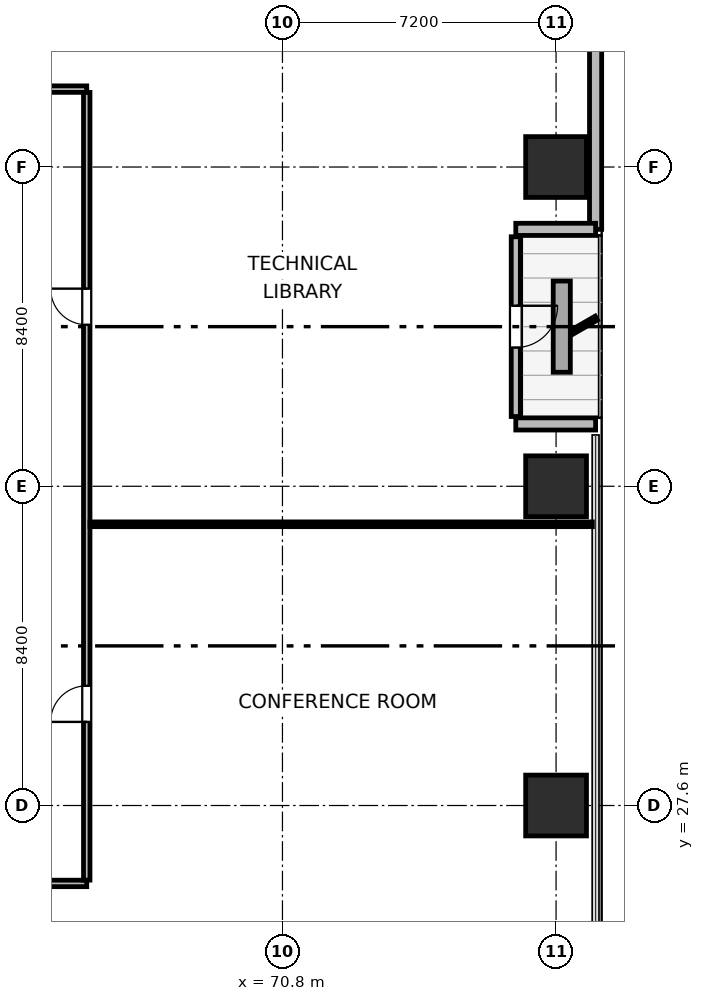
"""IFC4 building model, lengths in metres.
Left out: names, types, materials, properties, quantities, classifications, styles, units other than length and angle.
Written with IfcOpenShell. Run it as: python <this file> out.ifc"""

import sys

from ifc_helpers import new_model, si_unit, direction, frame, frame_2d, origin, origin_2d, place, context, subcontext, project, spatial, rectangle, extrude, element, fill, save


model = new_model("IFC4")
c1 = context("Model", 3, precision=1e-05, world=origin(), true_north=direction((0.0, 1.0)))
c2 = subcontext(c1, "Body", "Model", "MODEL_VIEW")
j1 = project(units=[si_unit("LENGTHUNIT", "METRE"), si_unit("PLANEANGLEUNIT", "RADIAN")], contexts=[c1])
p1 = place(None, origin())
s1 = spatial("IfcSite", under=j1, at=p1, CompositionType="ELEMENT")
p2 = place(p1, origin())
s2 = spatial("IfcBuilding", under=s1, at=p2, CompositionType="ELEMENT")
p3 = place(p2, frame((0.0, 0.0, 21.6)))
s3 = spatial("IfcBuildingStorey", under=s2, at=p3, CompositionType="ELEMENT", Elevation=21.6)
for number, where, z_axis, x_axis in (
    (1, (78.0, 27.6, 0.0), (0.0, 0.0, 1.0), (1.0, 0.0, 0.0)),
    (2, (78.0, 36.0, 0.0), (0.0, 0.0, 1.0), (1.0, 0.0, 0.0)),
    (3, (78.0, 44.4, 0.0), (0.0, 0.0, 1.0), (1.0, 0.0, 0.0)),
):
    element("IfcColumn", number, at=place(p3, frame(where, z_axis=z_axis, x_axis=x_axis)), inside=s3, PredefinedType="COLUMN", context=c2, shape_type="SweptSolid", body=[
        extrude(rectangle(XDim=1.6, YDim=1.6, at=origin_2d()), origin(), (0.0, 0.0, 1.0), 3.9),
    ])
p4 = place(p3, frame((79.04, 56.979, 0.0), z_axis=(0.0, 0.0, 1.0), x_axis=(0.0, -1.0, 0.0)))
e4 = element("IfcWall", 4, at=p4, inside=s3, PredefinedType="SOLIDWALL", context=c2, shape_type="SweptSolid", body=[
    extrude(rectangle(XDim=14.219, YDim=0.32, at=frame_2d((7.109, 0.0))), origin(), (0.0, 0.0, 1.0), 3.64),
])
p5 = place(p3, frame((79.04, 42.76, 0.0), z_axis=(0.0, 0.0, 1.0), x_axis=(-1.0, 0.0, 0.0)))
e5 = element("IfcWall", 5, at=p5, inside=s3, PredefinedType="SOLIDWALL", context=c2, shape_type="SweptSolid", body=[
    extrude(rectangle(XDim=2.1, YDim=0.32, at=frame_2d((1.05, 0.0))), origin(), (0.0, 0.0, 1.0), 2.875),
])
p6 = place(p3, frame((76.94, 42.565, 0.0), z_axis=(0.0, 0.0, 1.0), x_axis=(0.0, -1.0, 0.0)))
e6 = element("IfcWall", 6, at=p6, inside=s3, PredefinedType="SOLIDWALL", context=c2, shape_type="SweptSolid", body=[
    extrude(rectangle(XDim=4.73, YDim=0.24, at=frame_2d((2.365, 0.0))), origin(), (0.0, 0.0, 1.0), 3.162),
])
p7 = place(p6, frame((1.815, 0.0, 0.0)))
e7 = element("IfcOpeningElement", 7, at=p7, cuts=e6, PredefinedType="OPENING", context=c2, shape_type="SweptSolid", body=[
    extrude(rectangle(XDim=1.1, YDim=2.04, at=frame_2d((0.55, 1.02))), frame((0.0, 0.13, 0.0), z_axis=(0.0, -1.0, 0.0), x_axis=(1.0, 0.0, 0.0)), (0.0, 0.0, 1.0), 0.26),
])
p8 = place(p3, frame((76.94, 37.64, 0.0), z_axis=(0.0, 0.0, 1.0), x_axis=(1.0, 0.0, 0.0)))
e8 = element("IfcWall", 8, at=p8, inside=s3, PredefinedType="SOLIDWALL", context=c2, shape_type="SweptSolid", body=[
    extrude(rectangle(XDim=2.1, YDim=0.32, at=frame_2d((1.05, 0.0))), origin(), (0.0, 0.0, 1.0), 2.875),
])
p9 = place(p3, frame((30.35, 25.55, 0.0), z_axis=(0.0, 0.0, 1.0), x_axis=(1.0, 0.0, 0.0)))
e9 = element("IfcWall", 9, at=p9, inside=s3, PredefinedType="PARTITIONING", context=c2, shape_type="SweptSolid", body=[
    extrude(rectangle(XDim=35.3, YDim=0.17, at=frame_2d((17.65, 0.0))), origin(), (0.0, 0.0, 1.0), 3.64),
])
p10 = place(p9, frame((8.35, 0.0, 0.0)))
e10 = element("IfcOpeningElement", 10, at=p10, cuts=e9, PredefinedType="OPENING", context=c2, shape_type="SweptSolid", body=[
    extrude(rectangle(XDim=0.95, YDim=2.04, at=frame_2d((0.475, 1.02))), frame((0.0, 0.095, 0.0), z_axis=(0.0, -1.0, 0.0), x_axis=(1.0, 0.0, 0.0)), (0.0, 0.0, 1.0), 0.19),
])
p11 = place(p9, frame((26.0, 0.0, 0.0)))
e11 = element("IfcOpeningElement", 11, at=p11, cuts=e9, PredefinedType="OPENING", context=c2, shape_type="SweptSolid", body=[
    extrude(rectangle(XDim=0.95, YDim=2.04, at=frame_2d((0.475, 1.02))), frame((0.0, 0.095, 0.0), z_axis=(0.0, -1.0, 0.0), x_axis=(1.0, 0.0, 0.0)), (0.0, 0.0, 1.0), 0.19),
])
p12 = place(p3, frame((30.35, 46.45, 0.0), z_axis=(0.0, 0.0, 1.0), x_axis=(1.0, 0.0, 0.0)))
e12 = element("IfcWall", 12, at=p12, inside=s3, PredefinedType="PARTITIONING", context=c2, shape_type="SweptSolid", body=[
    extrude(rectangle(XDim=35.3, YDim=0.17, at=frame_2d((17.65, 0.0))), origin(), (0.0, 0.0, 1.0), 3.64),
])
p13 = place(p12, frame((6.21, 0.0, 0.0)))
e13 = element("IfcOpeningElement", 13, at=p13, cuts=e12, PredefinedType="OPENING", context=c2, shape_type="SweptSolid", body=[
    extrude(rectangle(XDim=0.95, YDim=2.04, at=frame_2d((0.475, 1.02))), frame((0.0, 0.095, 0.0), z_axis=(0.0, -1.0, 0.0), x_axis=(1.0, 0.0, 0.0)), (0.0, 0.0, 1.0), 0.19),
])
p14 = place(p12, frame((15.38, 0.0, 0.0)))
e14 = element("IfcOpeningElement", 14, at=p14, cuts=e12, PredefinedType="OPENING", context=c2, shape_type="SweptSolid", body=[
    extrude(rectangle(XDim=0.95, YDim=2.04, at=frame_2d((0.475, 1.02))), frame((0.0, 0.095, 0.0), z_axis=(0.0, -1.0, 0.0), x_axis=(1.0, 0.0, 0.0)), (0.0, 0.0, 1.0), 0.19),
])
p15 = place(p12, frame((26.345, 0.0, 0.0)))
e15 = element("IfcOpeningElement", 15, at=p15, cuts=e12, PredefinedType="OPENING", context=c2, shape_type="SweptSolid", body=[
    extrude(rectangle(XDim=0.95, YDim=2.04, at=frame_2d((0.475, 1.02))), frame((0.0, 0.095, 0.0), z_axis=(0.0, -1.0, 0.0), x_axis=(1.0, 0.0, 0.0)), (0.0, 0.0, 1.0), 0.19),
])
p16 = place(p3, frame((65.65, 25.637, 0.0), z_axis=(0.0, 0.0, 1.0), x_axis=(0.0, 1.0, 0.0)))
e16 = element("IfcWall", 16, at=p16, inside=s3, PredefinedType="PARTITIONING", context=c2, shape_type="SweptSolid", body=[
    extrude(rectangle(XDim=20.726, YDim=0.17, at=frame_2d((10.363, 0.0))), origin(), (0.0, 0.0, 1.0), 3.64),
])
p17 = place(p16, frame((4.163, 0.0, 0.0)))
e17 = element("IfcOpeningElement", 17, at=p17, cuts=e16, PredefinedType="OPENING", context=c2, shape_type="SweptSolid", body=[
    extrude(rectangle(XDim=0.95, YDim=2.04, at=frame_2d((0.475, 1.02))), frame((0.0, 0.095, 0.0), z_axis=(0.0, -1.0, 0.0), x_axis=(1.0, 0.0, 0.0)), (0.0, 0.0, 1.0), 0.19),
])
p18 = place(p16, frame((14.613, 0.0, 0.0)))
e18 = element("IfcOpeningElement", 18, at=p18, cuts=e16, PredefinedType="OPENING", context=c2, shape_type="SweptSolid", body=[
    extrude(rectangle(XDim=0.95, YDim=2.04, at=frame_2d((0.475, 1.02))), frame((0.0, 0.095, 0.0), z_axis=(0.0, -1.0, 0.0), x_axis=(1.0, 0.0, 0.0)), (0.0, 0.0, 1.0), 0.19),
])
p19 = place(p3, frame((65.737, 35.0, 0.0), z_axis=(0.0, 0.0, 1.0), x_axis=(1.0, 0.0, 0.0)))
e19 = element("IfcWall", 19, at=p19, inside=s3, PredefinedType="PARTITIONING", context=c2, shape_type="SweptSolid", body=[
    extrude(rectangle(XDim=13.218, YDim=0.125, at=frame_2d((6.609, 0.0))), origin(), (0.0, 0.0, 1.0), 3.64),
])
p20 = place(p7, origin())
e20 = element("IfcDoor", 20, at=p20, inside=s3, OperationType="SINGLE_SWING_LEFT", PredefinedType="DOOR", context=c2, shape_type="SweptSolid", body=[
    extrude(rectangle(XDim=1.1, YDim=2.04, at=frame_2d((0.55, 1.02))), frame((0.0, 0.025, 0.0), z_axis=(0.0, -1.0, 0.0), x_axis=(1.0, 0.0, 0.0)), (0.0, 0.0, 1.0), 0.05),
])
fill(e7, e20)
p21 = place(p17, origin())
e21 = element("IfcDoor", 21, at=p21, inside=s3, OperationType="SINGLE_SWING_LEFT", PredefinedType="DOOR", context=c2, shape_type="SweptSolid", body=[
    extrude(rectangle(XDim=0.95, YDim=2.04, at=frame_2d((0.475, 1.02))), frame((0.0, 0.025, 0.0), z_axis=(0.0, -1.0, 0.0), x_axis=(1.0, 0.0, 0.0)), (0.0, 0.0, 1.0), 0.05),
])
fill(e17, e21)
p22 = place(p18, origin())
e22 = element("IfcDoor", 22, at=p22, inside=s3, OperationType="SINGLE_SWING_RIGHT", PredefinedType="DOOR", context=c2, shape_type="SweptSolid", body=[
    extrude(rectangle(XDim=0.95, YDim=2.04, at=frame_2d((0.475, 1.02))), frame((0.0, 0.025, 0.0), z_axis=(0.0, -1.0, 0.0), x_axis=(1.0, 0.0, 0.0)), (0.0, 0.0, 1.0), 0.05),
])
fill(e18, e22)
save(model, sys.argv[1])
